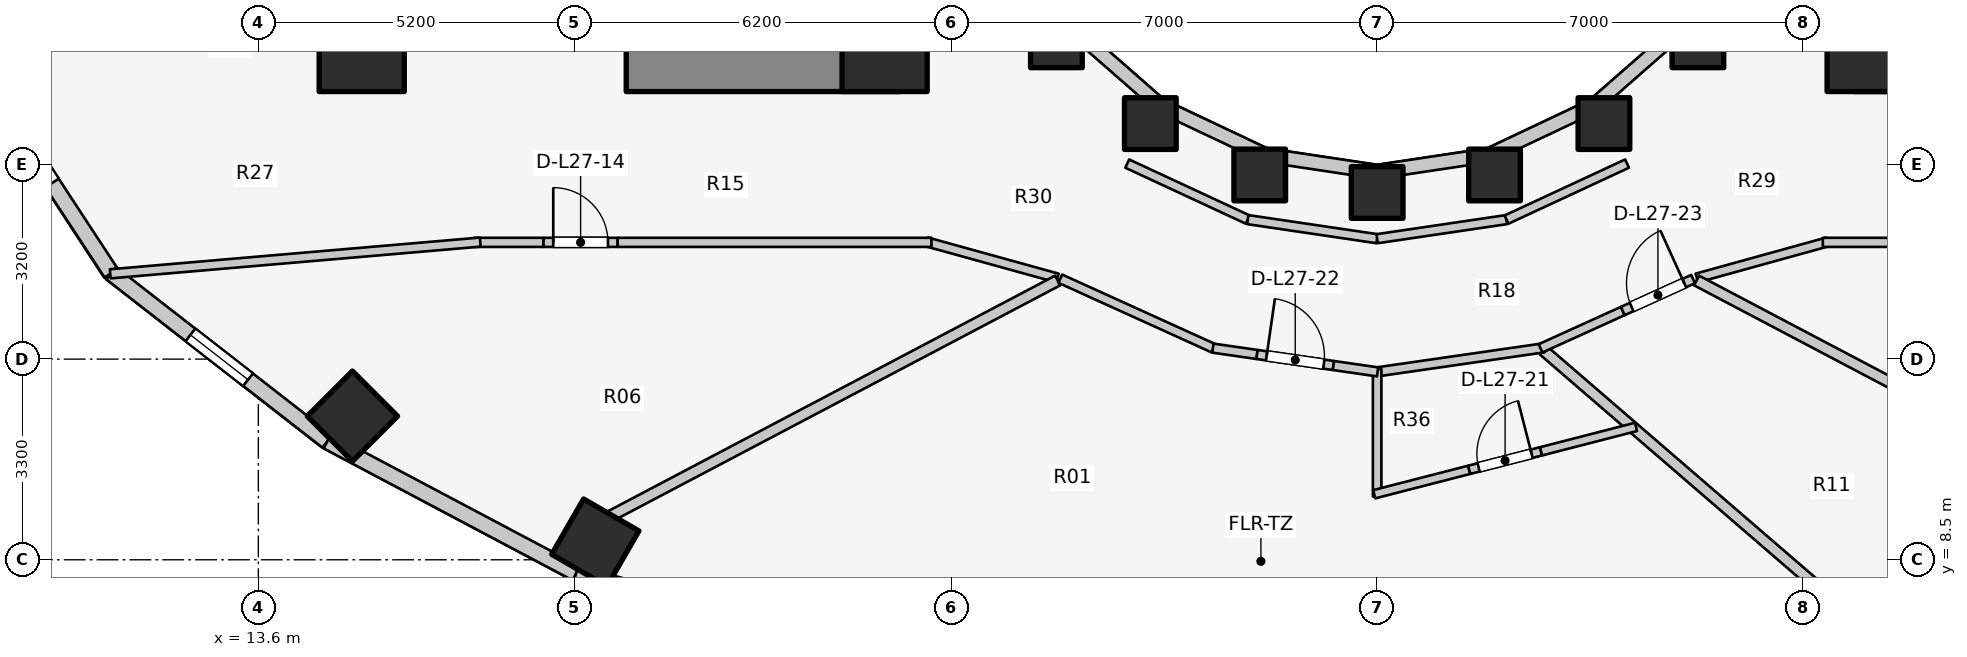
"""IFC4 building model, lengths in metres.
Left out: names, types, materials, properties, quantities, classifications, styles, units other than length and angle.
Written with IfcOpenShell. Run it as: python <this file> out.ifc"""

import sys

from ifc_helpers import new_model, si_unit, direction, frame, frame_2d, origin, origin_2d, place, context, subcontext, project, spatial, rectangle, extrude, element, fill, save


model = new_model("IFC4")
c1 = context("Model", 3, precision=1e-05, world=origin(), true_north=direction((0.0, 1.0)))
c2 = subcontext(c1, "Body", "Model", "MODEL_VIEW")
j1 = project(units=[si_unit("LENGTHUNIT", "METRE"), si_unit("PLANEANGLEUNIT", "RADIAN")], contexts=[c1])
p1 = place(None, origin())
s1 = spatial("IfcSite", under=j1, at=p1, CompositionType="ELEMENT")
p2 = place(p1, origin())
s2 = spatial("IfcBuilding", under=s1, at=p2, CompositionType="ELEMENT")
p3 = place(p2, frame((0.0, 0.0, 91.8)))
s3 = spatial("IfcBuildingStorey", under=s2, at=p3, CompositionType="ELEMENT", Elevation=91.8)
for number, where, z_axis, x_axis in (
    (1, (19.65, 16.55, 0.0), (0.0, 0.0, 1.0), (1.0, 0.0, 0.0)),
    (2, (39.85, 16.55, 0.0), (0.0, 0.0, 1.0), (1.0, 0.0, 0.0)),
):
    element("IfcWall", number, at=place(p3, frame(where, z_axis=z_axis, x_axis=x_axis)), inside=s3, PredefinedType="SHEAR", context=c2, shape_type="SweptSolid", body=[
        extrude(rectangle(XDim=4.5, YDim=0.7, at=frame_2d((2.25, 0.0))), origin(), (0.0, 0.0, 1.0), 3.1),
    ])
for number, where, z_axis, x_axis in (
    (3, (15.3, 16.9, 0.0), (0.0, 0.0, 1.0), (1.0, 0.0, 0.0)),
    (4, (23.9, 16.9, 0.0), (0.0, 0.0, 1.0), (1.0, 0.0, 0.0)),
    (5, (40.1, 16.9, 0.0), (0.0, 0.0, 1.0), (1.0, 0.0, 0.0)),
):
    element("IfcColumn", number, at=place(p3, frame(where, z_axis=z_axis, x_axis=x_axis)), inside=s3, PredefinedType="COLUMN", context=c2, shape_type="SweptSolid", body=[
        extrude(rectangle(XDim=1.4, YDim=1.4, at=origin_2d()), origin(), (0.0, 0.0, 1.0), 3.1),
    ])
p4 = place(p3, frame((26.725, 17.018, 0.0), z_axis=(0.0, 0.0, 1.0), x_axis=(1.0, 0.0, 0.0)))
e6 = element("IfcColumn", 6, at=p4, inside=s3, PredefinedType="COLUMN", context=c2, shape_type="SweptSolid", body=[
    extrude(rectangle(XDim=0.85, YDim=0.85, at=origin_2d()), origin(), (0.0, 0.0, 1.0), 3.1),
])
p5 = place(p3, frame((15.147, 10.862, 0.0), z_axis=(0.0, 0.0, 1.0), x_axis=(-0.707106781187, -0.707106781187, 0.0)))
e7 = element("IfcColumn", 7, at=p5, inside=s3, PredefinedType="COLUMN", context=c2, shape_type="SweptSolid", body=[
    extrude(rectangle(XDim=1.05, YDim=1.05, at=origin_2d()), origin(), (0.0, 0.0, 1.0), 3.1),
])
p6 = place(p3, frame((28.27, 15.673, 0.0), z_axis=(0.0, 0.0, 1.0), x_axis=(1.0, 0.0, 0.0)))
e8 = element("IfcColumn", 8, at=p6, inside=s3, PredefinedType="COLUMN", context=c2, shape_type="SweptSolid", body=[
    extrude(rectangle(XDim=0.85, YDim=0.85, at=origin_2d()), origin(), (0.0, 0.0, 1.0), 3.1),
])
p7 = place(p3, frame((19.142, 8.782, 0.0), z_axis=(0.0, 0.0, 1.0), x_axis=(-0.5, -0.866025403784, 0.0)))
e9 = element("IfcColumn", 9, at=p7, inside=s3, PredefinedType="COLUMN", context=c2, shape_type="SweptSolid", body=[
    extrude(rectangle(XDim=1.05, YDim=1.05, at=origin_2d()), origin(), (0.0, 0.0, 1.0), 3.1),
])
for number, where, z_axis, x_axis in (
    (10, (30.069, 14.828, 0.0), (0.0, 0.0, 1.0), (1.0, 0.0, 0.0)),
    (11, (32.0, 14.54, 0.0), (0.0, 0.0, 1.0), (1.0, 0.0, 0.0)),
    (12, (33.931, 14.828, 0.0), (0.0, 0.0, 1.0), (1.0, 0.0, 0.0)),
    (13, (35.73, 15.673, 0.0), (0.0, 0.0, 1.0), (1.0, 0.0, 0.0)),
    (14, (37.275, 17.018, 0.0), (0.0, 0.0, 1.0), (1.0, 0.0, 0.0)),
):
    element("IfcColumn", number, at=place(p3, frame(where, z_axis=z_axis, x_axis=x_axis)), inside=s3, PredefinedType="COLUMN", context=c2, shape_type="SweptSolid", body=[
        extrude(rectangle(XDim=0.85, YDim=0.85, at=origin_2d()), origin(), (0.0, 0.0, 1.0), 3.1),
    ])
p8 = place(p3, frame((26.965, 17.258, 0.0), z_axis=(0.0, 0.0, 1.0), x_axis=(0.752576694707, -0.658504607869, 0.0)))
e15 = element("IfcWall", 15, at=p8, inside=s3, PredefinedType="STANDARD", context=c2, shape_type="SweptSolid", body=[
    extrude(rectangle(XDim=1.959, YDim=0.23, at=frame_2d((0.98, 0.0))), origin(), (0.0, 0.0, 1.0), 1.22),
])
p9 = place(p3, frame((28.44, 15.968, 0.0), z_axis=(0.0, 0.0, 1.0), x_axis=(0.904179699603, -0.427152280606, 0.0)))
e16 = element("IfcWall", 16, at=p9, inside=s3, PredefinedType="STANDARD", context=c2, shape_type="SweptSolid", body=[
    extrude(rectangle(XDim=1.899, YDim=0.23, at=frame_2d((0.95, 0.0))), origin(), (0.0, 0.0, 1.0), 1.22),
])
for number, where, z_axis, x_axis in (
    (17, (30.157, 15.157, 0.0), (0.0, 0.0, 1.0), (0.989, -0.149, 0.0)),
    (18, (32.0, 14.88, 0.0), (0.0, 0.0, 1.0), (0.989, 0.149, 0.0)),
):
    element("IfcWall", number, at=place(p3, frame(where, z_axis=z_axis, x_axis=x_axis)), inside=s3, PredefinedType="STANDARD", context=c2, shape_type="SweptSolid", body=[
        extrude(rectangle(XDim=1.864, YDim=0.23, at=frame_2d((0.932, 0.0))), origin(), (0.0, 0.0, 1.0), 1.22),
    ])
p10 = place(p3, frame((33.843, 15.157, 0.0), z_axis=(0.0, 0.0, 1.0), x_axis=(0.904179699603, 0.427152280606, 0.0)))
e19 = element("IfcWall", 19, at=p10, inside=s3, PredefinedType="STANDARD", context=c2, shape_type="SweptSolid", body=[
    extrude(rectangle(XDim=1.899, YDim=0.23, at=frame_2d((0.95, 0.0))), origin(), (0.0, 0.0, 1.0), 1.22),
])
p11 = place(p3, frame((35.56, 15.968, 0.0), z_axis=(0.0, 0.0, 1.0), x_axis=(0.752576694707, 0.658504607869, 0.0)))
e20 = element("IfcWall", 20, at=p11, inside=s3, PredefinedType="STANDARD", context=c2, shape_type="SweptSolid", body=[
    extrude(rectangle(XDim=1.959, YDim=0.23, at=frame_2d((0.98, 0.0))), origin(), (0.0, 0.0, 1.0), 1.22),
])
p12 = place(p3, frame((8.578, 17.181, 0.0), z_axis=(0.0, 0.0, 1.0), x_axis=(0.548283220945, -0.836292717672, 0.0)))
e21 = element("IfcWall", 21, at=p12, inside=s3, PredefinedType="STANDARD", context=c2, shape_type="SweptSolid", body=[
    extrude(rectangle(XDim=4.744, YDim=0.26, at=frame_2d((2.372, 0.0))), origin(), (0.0, 0.0, 1.0), 1.22),
])
p13 = place(p12, frame((1.772, 0.0, 0.15)))
e22 = element("IfcOpeningElement", 22, at=p13, cuts=e21, PredefinedType="OPENING", context=c2, shape_type="SweptSolid", body=[
    extrude(rectangle(XDim=1.2, YDim=0.9, at=frame_2d((0.6, 0.45))), frame((0.0, 0.14, 0.0), z_axis=(0.0, -1.0, 0.0), x_axis=(1.0, 0.0, 0.0)), (0.0, 0.0, 1.0), 0.28),
])
p14 = place(p3, frame((11.179, 13.214, 0.0), z_axis=(0.0, 0.0, 1.0), x_axis=(0.789127449954, -0.614229491094, 0.0)))
e23 = element("IfcWall", 23, at=p14, inside=s3, PredefinedType="STANDARD", context=c2, shape_type="SweptSolid", body=[
    extrude(rectangle(XDim=4.505, YDim=0.26, at=frame_2d((2.252, 0.0))), origin(), (0.0, 0.0, 1.0), 1.22),
])
p15 = place(p14, frame((1.652, 0.0, 0.15)))
e24 = element("IfcOpeningElement", 24, at=p15, cuts=e23, PredefinedType="OPENING", context=c2, shape_type="SweptSolid", body=[
    extrude(rectangle(XDim=1.2, YDim=0.9, at=frame_2d((0.6, 0.45))), frame((0.0, 0.14, 0.0), z_axis=(0.0, -1.0, 0.0), x_axis=(1.0, 0.0, 0.0)), (0.0, 0.0, 1.0), 0.28),
])
p16 = place(p3, frame((14.734, 10.447, 0.0), z_axis=(0.0, 0.0, 1.0), x_axis=(0.883668636807, -0.4681129568, 0.0)))
e25 = element("IfcWall", 25, at=p16, inside=s3, PredefinedType="STANDARD", context=c2, shape_type="SweptSolid", body=[
    extrude(rectangle(XDim=4.631, YDim=0.26, at=frame_2d((2.316, 0.0))), origin(), (0.0, 0.0, 1.0), 1.22),
])
p17 = place(p3, frame((18.827, 8.279, 0.0), z_axis=(0.0, 0.0, 1.0), x_axis=(0.962938491413, -0.269721081407, 0.0)))
e26 = element("IfcWall", 26, at=p17, inside=s3, PredefinedType="STANDARD", context=c2, shape_type="SweptSolid", body=[
    extrude(rectangle(XDim=5.563, YDim=0.26, at=frame_2d((2.782, 0.0))), origin(), (0.0, 0.0, 1.0), 1.22),
])
p18 = place(p17, frame((2.182, 0.0, 0.15)))
e27 = element("IfcOpeningElement", 27, at=p18, cuts=e26, PredefinedType="OPENING", context=c2, shape_type="SweptSolid", body=[
    extrude(rectangle(XDim=1.2, YDim=0.9, at=frame_2d((0.6, 0.45))), frame((0.0, 0.14, 0.0), z_axis=(0.0, -1.0, 0.0), x_axis=(1.0, 0.0, 0.0)), (0.0, 0.0, 1.0), 0.28),
])
p19 = place(p3, frame((39.816, 6.778, 0.0), z_axis=(0.0, 0.0, 1.0), x_axis=(0.962938491413, 0.269721081407, 0.0)))
e28 = element("IfcWall", 28, at=p19, inside=s3, PredefinedType="STANDARD", context=c2, shape_type="SweptSolid", body=[
    extrude(rectangle(XDim=5.563, YDim=0.26, at=frame_2d((2.782, 0.0))), origin(), (0.0, 0.0, 1.0), 1.22),
])
p20 = place(p19, frame((2.182, 0.0, 0.15)))
e29 = element("IfcOpeningElement", 29, at=p20, cuts=e28, PredefinedType="OPENING", context=c2, shape_type="SweptSolid", body=[
    extrude(rectangle(XDim=1.2, YDim=0.9, at=frame_2d((0.6, 0.45))), frame((0.0, 0.14, 0.0), z_axis=(0.0, -1.0, 0.0), x_axis=(1.0, 0.0, 0.0)), (0.0, 0.0, 1.0), 0.28),
])
p21 = place(p3, frame((27.89, 15.015, 0.0), z_axis=(0.0, 0.0, 1.0), x_axis=(0.906943449489, -0.421252393975, 0.0)))
e30 = element("IfcWall", 30, at=p21, inside=s3, PredefinedType="PARTITIONING", context=c2, shape_type="SweptSolid", body=[
    extrude(rectangle(XDim=2.186, YDim=0.15, at=frame_2d((1.093, 0.0))), origin(), (0.0, 0.0, 1.0), 1.22),
])
for number, where, z_axis, x_axis in (
    (31, (29.873, 14.094, 0.0), (0.0, 0.0, 1.0), (0.989, -0.146, 0.0)),
    (32, (32.0, 13.78, 0.0), (0.0, 0.0, 1.0), (0.989, 0.146, 0.0)),
):
    element("IfcWall", number, at=place(p3, frame(where, z_axis=z_axis, x_axis=x_axis)), inside=s3, PredefinedType="PARTITIONING", context=c2, shape_type="SweptSolid", body=[
        extrude(rectangle(XDim=2.151, YDim=0.15, at=frame_2d((1.075, 0.0))), origin(), (0.0, 0.0, 1.0), 1.22),
    ])
p22 = place(p3, frame((34.127, 14.094, 0.0), z_axis=(0.0, 0.0, 1.0), x_axis=(0.906943449489, 0.421252393975, 0.0)))
e33 = element("IfcWall", 33, at=p22, inside=s3, PredefinedType="PARTITIONING", context=c2, shape_type="SweptSolid", body=[
    extrude(rectangle(XDim=2.186, YDim=0.15, at=frame_2d((1.093, 0.0))), origin(), (0.0, 0.0, 1.0), 1.22),
])
p23 = place(p3, frame((26.742, 13.133, 0.0), z_axis=(0.0, 0.0, 1.0), x_axis=(-0.963833843713, 0.266503886865, 0.0)))
e34 = element("IfcWall", 34, at=p23, inside=s3, PredefinedType="PARTITIONING", context=c2, shape_type="SweptSolid", body=[
    extrude(rectangle(XDim=2.232, YDim=0.15, at=frame_2d((1.116, 0.0))), origin(), (0.0, 0.0, 1.0), 1.22),
])
p24 = place(p3, frame((17.15, 13.72, 0.0), z_axis=(0.0, 0.0, 1.0), x_axis=(1.0, 0.0, 0.0)))
e35 = element("IfcWall", 35, at=p24, inside=s3, PredefinedType="PARTITIONING", context=c2, shape_type="SweptSolid", body=[
    extrude(rectangle(XDim=1.14, YDim=0.15, at=frame_2d((0.57, 0.0))), origin(), (0.0, 0.0, 1.0), 2.575),
])
p25 = place(p3, frame((18.29, 13.72, 0.0), z_axis=(0.0, 0.0, 1.0), x_axis=(1.0, 0.0, 0.0)))
e36 = element("IfcWall", 36, at=p25, inside=s3, PredefinedType="PARTITIONING", context=c2, shape_type="SweptSolid", body=[
    extrude(rectangle(XDim=1.22, YDim=0.15, at=frame_2d((0.61, 0.0))), origin(), (0.0, 0.0, 1.0), 2.16),
])
p26 = place(p25, frame((0.16, 0.0, 0.0)))
e37 = element("IfcOpeningElement", 37, at=p26, cuts=e36, PredefinedType="OPENING", context=c2, shape_type="SweptSolid", body=[
    extrude(rectangle(XDim=0.9, YDim=2.1, at=frame_2d((0.45, 1.05))), frame((0.0, 0.085, 0.0), z_axis=(0.0, -1.0, 0.0), x_axis=(1.0, 0.0, 0.0)), (0.0, 0.0, 1.0), 0.17),
])
p27 = place(p3, frame((19.51, 13.72, 0.0), z_axis=(0.0, 0.0, 1.0), x_axis=(1.0, 0.0, 0.0)))
e38 = element("IfcWall", 38, at=p27, inside=s3, PredefinedType="PARTITIONING", context=c2, shape_type="SweptSolid", body=[
    extrude(rectangle(XDim=5.16, YDim=0.15, at=frame_2d((2.58, 0.0))), origin(), (0.0, 0.0, 1.0), 1.22),
])
p28 = place(p3, frame((17.25, 13.724, 0.0), z_axis=(0.0, 0.0, 1.0), x_axis=(-0.996341886029, -0.085456691633, 0.0)))
e39 = element("IfcWall", 39, at=p28, inside=s3, PredefinedType="PARTITIONING", context=c2, shape_type="SweptSolid", body=[
    extrude(rectangle(XDim=6.108, YDim=0.15, at=frame_2d((3.054, 0.0))), origin(), (0.0, 0.0, 1.0), 1.22),
])
p29 = place(p3, frame((37.258, 13.133, 0.0), z_axis=(0.0, 0.0, 1.0), x_axis=(0.963833843713, 0.266503886865, 0.0)))
e40 = element("IfcWall", 40, at=p29, inside=s3, PredefinedType="PARTITIONING", context=c2, shape_type="SweptSolid", body=[
    extrude(rectangle(XDim=2.232, YDim=0.15, at=frame_2d((1.116, 0.0))), origin(), (0.0, 0.0, 1.0), 1.22),
])
p30 = place(p3, frame((39.33, 13.72, 0.0), z_axis=(0.0, 0.0, 1.0), x_axis=(1.0, 0.0, 0.0)))
e41 = element("IfcWall", 41, at=p30, inside=s3, PredefinedType="PARTITIONING", context=c2, shape_type="SweptSolid", body=[
    extrude(rectangle(XDim=5.06, YDim=0.15, at=frame_2d((2.53, 0.0))), origin(), (0.0, 0.0, 1.0), 1.22),
])
p31 = place(p3, frame((26.746, 13.093, 0.0), z_axis=(0.0, 0.0, 1.0), x_axis=(-0.884730147854, -0.466103599512, 0.0)))
e42 = element("IfcWall", 42, at=p31, inside=s3, PredefinedType="PARTITIONING", context=c2, shape_type="SweptSolid", body=[
    extrude(rectangle(XDim=8.31, YDim=0.18, at=frame_2d((4.155, 0.0))), origin(), (0.0, 0.0, 1.0), 1.22),
])
p32 = place(p3, frame((34.736, 11.943, 0.0), z_axis=(0.0, 0.0, 1.0), x_axis=(0.757299396002, -0.65306785621, 0.0)))
e43 = element("IfcWall", 43, at=p32, inside=s3, PredefinedType="PARTITIONING", context=c2, shape_type="SweptSolid", body=[
    extrude(rectangle(XDim=6.289, YDim=0.18, at=frame_2d((3.145, 0.0))), origin(), (0.0, 0.0, 1.0), 1.22),
])
p33 = place(p3, frame((37.254, 13.093, 0.0), z_axis=(0.0, 0.0, 1.0), x_axis=(0.884730147854, -0.466103599512, 0.0)))
e44 = element("IfcWall", 44, at=p33, inside=s3, PredefinedType="PARTITIONING", context=c2, shape_type="SweptSolid", body=[
    extrude(rectangle(XDim=8.31, YDim=0.18, at=frame_2d((4.155, 0.0))), origin(), (0.0, 0.0, 1.0), 1.22),
])
p34 = place(p3, frame((31.95, 11.583, 0.0), z_axis=(0.0, 0.0, 1.0), x_axis=(0.989761784218, 0.142729150844, 0.0)))
e45 = element("IfcWall", 45, at=p34, inside=s3, PredefinedType="PARTITIONING", context=c2, shape_type="SweptSolid", body=[
    extrude(rectangle(XDim=2.822, YDim=0.15, at=frame_2d((1.411, 0.0))), origin(), (0.0, 0.0, 1.0), 1.22),
])
p35 = place(p3, frame((32.0, 11.64, 0.0), z_axis=(0.0, 0.0, 1.0), x_axis=(0.0, -1.0, 0.0)))
e46 = element("IfcWall", 46, at=p35, inside=s3, PredefinedType="PLUMBINGWALL", context=c2, shape_type="SweptSolid", body=[
    extrude(rectangle(XDim=2.1, YDim=0.14, at=frame_2d((1.05, 0.0))), origin(), (0.0, 0.0, 1.0), 1.22),
])
p36 = place(p3, frame((31.952, 9.577, 0.0), z_axis=(0.0, 0.0, 1.0), x_axis=(0.968427184166, 0.249296588359, 0.0)))
e47 = element("IfcWall", 47, at=p36, inside=s3, PredefinedType="PLUMBINGWALL", context=c2, shape_type="SweptSolid", body=[
    extrude(rectangle(XDim=1.613, YDim=0.14, at=frame_2d((0.807, 0.0))), origin(), (0.0, 0.0, 1.0), 1.22),
])
p37 = place(p3, frame((33.514, 9.979, 0.0), z_axis=(0.0, 0.0, 1.0), x_axis=(0.968520506564, 0.248933783092, 0.0)))
e48 = element("IfcWall", 48, at=p37, inside=s3, PredefinedType="PLUMBINGWALL", context=c2, shape_type="SweptSolid", body=[
    extrude(rectangle(XDim=1.22, YDim=0.14, at=frame_2d((0.61, 0.0))), origin(), (0.0, 0.0, 1.0), 2.575),
])
p38 = place(p37, frame((0.16, 0.0, 0.0)))
e49 = element("IfcOpeningElement", 49, at=p38, cuts=e48, PredefinedType="OPENING", context=c2, shape_type="SweptSolid", body=[
    extrude(rectangle(XDim=0.9, YDim=2.1, at=frame_2d((0.45, 1.05))), frame((0.0, 0.08, 0.0), z_axis=(0.0, -1.0, 0.0), x_axis=(1.0, 0.0, 0.0)), (0.0, 0.0, 1.0), 0.16),
])
p39 = place(p3, frame((34.695, 10.283, 0.0), z_axis=(0.0, 0.0, 1.0), x_axis=(0.968427184166, 0.249296588359, 0.0)))
e50 = element("IfcWall", 50, at=p39, inside=s3, PredefinedType="PLUMBINGWALL", context=c2, shape_type="SweptSolid", body=[
    extrude(rectangle(XDim=1.613, YDim=0.14, at=frame_2d((0.807, 0.0))), origin(), (0.0, 0.0, 1.0), 2.575),
])
p40 = place(p3, frame((26.789, 13.123, 0.0), z_axis=(0.0, 0.0, 1.0), x_axis=(0.910568469686, -0.41335827319, 0.0)))
e51 = element("IfcWall", 51, at=p40, inside=s3, PredefinedType="PARTITIONING", context=c2, shape_type="SweptSolid", body=[
    extrude(rectangle(XDim=2.772, YDim=0.15, at=frame_2d((1.386, 0.0))), origin(), (0.0, 0.0, 1.0), 1.22),
])
p41 = place(p3, frame((29.299, 11.981, 0.0), z_axis=(0.0, 0.0, 1.0), x_axis=(0.98974875873, -0.142819447526, 0.0)))
e52 = element("IfcWall", 52, at=p41, inside=s3, PredefinedType="PARTITIONING", context=c2, shape_type="SweptSolid", body=[
    extrude(rectangle(XDim=0.733, YDim=0.15, at=frame_2d((0.367, 0.0))), origin(), (0.0, 0.0, 1.0), 2.575),
])
p42 = place(p3, frame((30.024, 11.876, 0.0), z_axis=(0.0, 0.0, 1.0), x_axis=(0.98974859422, -0.142820587591, 0.0)))
e53 = element("IfcWall", 53, at=p42, inside=s3, PredefinedType="PARTITIONING", context=c2, shape_type="SweptSolid", body=[
    extrude(rectangle(XDim=1.27, YDim=0.15, at=frame_2d((0.635, 0.0))), origin(), (0.0, 0.0, 1.0), 2.575),
])
p43 = place(p42, frame((0.16, 0.0, 0.0)))
e54 = element("IfcOpeningElement", 54, at=p43, cuts=e53, PredefinedType="OPENING", context=c2, shape_type="SweptSolid", body=[
    extrude(rectangle(XDim=0.95, YDim=2.1, at=frame_2d((0.475, 1.05))), frame((0.0, 0.085, 0.0), z_axis=(0.0, -1.0, 0.0), x_axis=(1.0, 0.0, 0.0)), (0.0, 0.0, 1.0), 0.17),
])
p44 = place(p3, frame((31.281, 11.695, 0.0), z_axis=(0.0, 0.0, 1.0), x_axis=(0.98974875873, -0.142819447526, 0.0)))
e55 = element("IfcWall", 55, at=p44, inside=s3, PredefinedType="PARTITIONING", context=c2, shape_type="SweptSolid", body=[
    extrude(rectangle(XDim=0.733, YDim=0.15, at=frame_2d((0.367, 0.0))), origin(), (0.0, 0.0, 1.0), 1.22),
])
p45 = place(p3, frame((34.687, 11.977, 0.0), z_axis=(0.0, 0.0, 1.0), x_axis=(0.910563383081, 0.41336947806, 0.0)))
e56 = element("IfcWall", 56, at=p45, inside=s3, PredefinedType="PARTITIONING", context=c2, shape_type="SweptSolid", body=[
    extrude(rectangle(XDim=1.485, YDim=0.15, at=frame_2d((0.743, 0.0))), origin(), (0.0, 0.0, 1.0), 1.22),
])
p46 = place(p3, frame((36.04, 12.591, 0.0), z_axis=(0.0, 0.0, 1.0), x_axis=(0.910596749825, 0.413295970472, 0.0)))
e57 = element("IfcWall", 57, at=p46, inside=s3, PredefinedType="PARTITIONING", context=c2, shape_type="SweptSolid", body=[
    extrude(rectangle(XDim=1.27, YDim=0.15, at=frame_2d((0.635, 0.0))), origin(), (0.0, 0.0, 1.0), 2.16),
])
p47 = place(p46, frame((0.16, 0.0, 0.0)))
e58 = element("IfcOpeningElement", 58, at=p47, cuts=e57, PredefinedType="OPENING", context=c2, shape_type="SweptSolid", body=[
    extrude(rectangle(XDim=0.95, YDim=2.1, at=frame_2d((0.475, 1.05))), frame((0.0, 0.085, 0.0), z_axis=(0.0, -1.0, 0.0), x_axis=(1.0, 0.0, 0.0)), (0.0, 0.0, 1.0), 0.17),
])
p48 = place(p13, origin())
e59 = element("IfcWindow", 59, at=p48, inside=s3, PartitioningType="SINGLE_PANEL", PredefinedType="WINDOW", context=c2, shape_type="SweptSolid", body=[
    extrude(rectangle(XDim=1.2, YDim=0.9, at=frame_2d((0.6, 0.45))), frame((0.0, 0.03, 0.0), z_axis=(0.0, -1.0, 0.0), x_axis=(1.0, 0.0, 0.0)), (0.0, 0.0, 1.0), 0.06),
])
fill(e22, e59)
p49 = place(p15, origin())
e60 = element("IfcWindow", 60, at=p49, inside=s3, PartitioningType="SINGLE_PANEL", PredefinedType="WINDOW", context=c2, shape_type="SweptSolid", body=[
    extrude(rectangle(XDim=1.2, YDim=0.9, at=frame_2d((0.6, 0.45))), frame((0.0, 0.03, 0.0), z_axis=(0.0, -1.0, 0.0), x_axis=(1.0, 0.0, 0.0)), (0.0, 0.0, 1.0), 0.06),
])
fill(e24, e60)
p50 = place(p26, origin())
e61 = element("IfcDoor", 61, at=p50, inside=s3, OperationType="SINGLE_SWING_LEFT", PredefinedType="DOOR", context=c2, shape_type="SweptSolid", body=[
    extrude(rectangle(XDim=0.9, YDim=2.1, at=frame_2d((0.45, 1.05))), frame((0.0, 0.025, 0.0), z_axis=(0.0, -1.0, 0.0), x_axis=(1.0, 0.0, 0.0)), (0.0, 0.0, 1.0), 0.05),
])
fill(e37, e61)
p51 = place(p38, origin())
e62 = element("IfcDoor", 62, at=p51, inside=s3, OperationType="SINGLE_SWING_RIGHT", PredefinedType="DOOR", context=c2, shape_type="SweptSolid", body=[
    extrude(rectangle(XDim=0.9, YDim=2.1, at=frame_2d((0.45, 1.05))), frame((0.0, 0.025, 0.0), z_axis=(0.0, -1.0, 0.0), x_axis=(1.0, 0.0, 0.0)), (0.0, 0.0, 1.0), 0.05),
])
fill(e49, e62)
p52 = place(p43, origin())
e63 = element("IfcDoor", 63, at=p52, inside=s3, OperationType="SINGLE_SWING_LEFT", PredefinedType="DOOR", context=c2, shape_type="SweptSolid", body=[
    extrude(rectangle(XDim=0.95, YDim=2.1, at=frame_2d((0.475, 1.05))), frame((0.0, 0.025, 0.0), z_axis=(0.0, -1.0, 0.0), x_axis=(1.0, 0.0, 0.0)), (0.0, 0.0, 1.0), 0.05),
])
fill(e54, e63)
p53 = place(p47, origin())
e64 = element("IfcDoor", 64, at=p53, inside=s3, OperationType="SINGLE_SWING_RIGHT", PredefinedType="DOOR", context=c2, shape_type="SweptSolid", body=[
    extrude(rectangle(XDim=0.95, YDim=2.1, at=frame_2d((0.475, 1.05))), frame((0.0, 0.025, 0.0), z_axis=(0.0, -1.0, 0.0), x_axis=(1.0, 0.0, 0.0)), (0.0, 0.0, 1.0), 0.05),
])
fill(e58, e64)
save(model, sys.argv[1])
